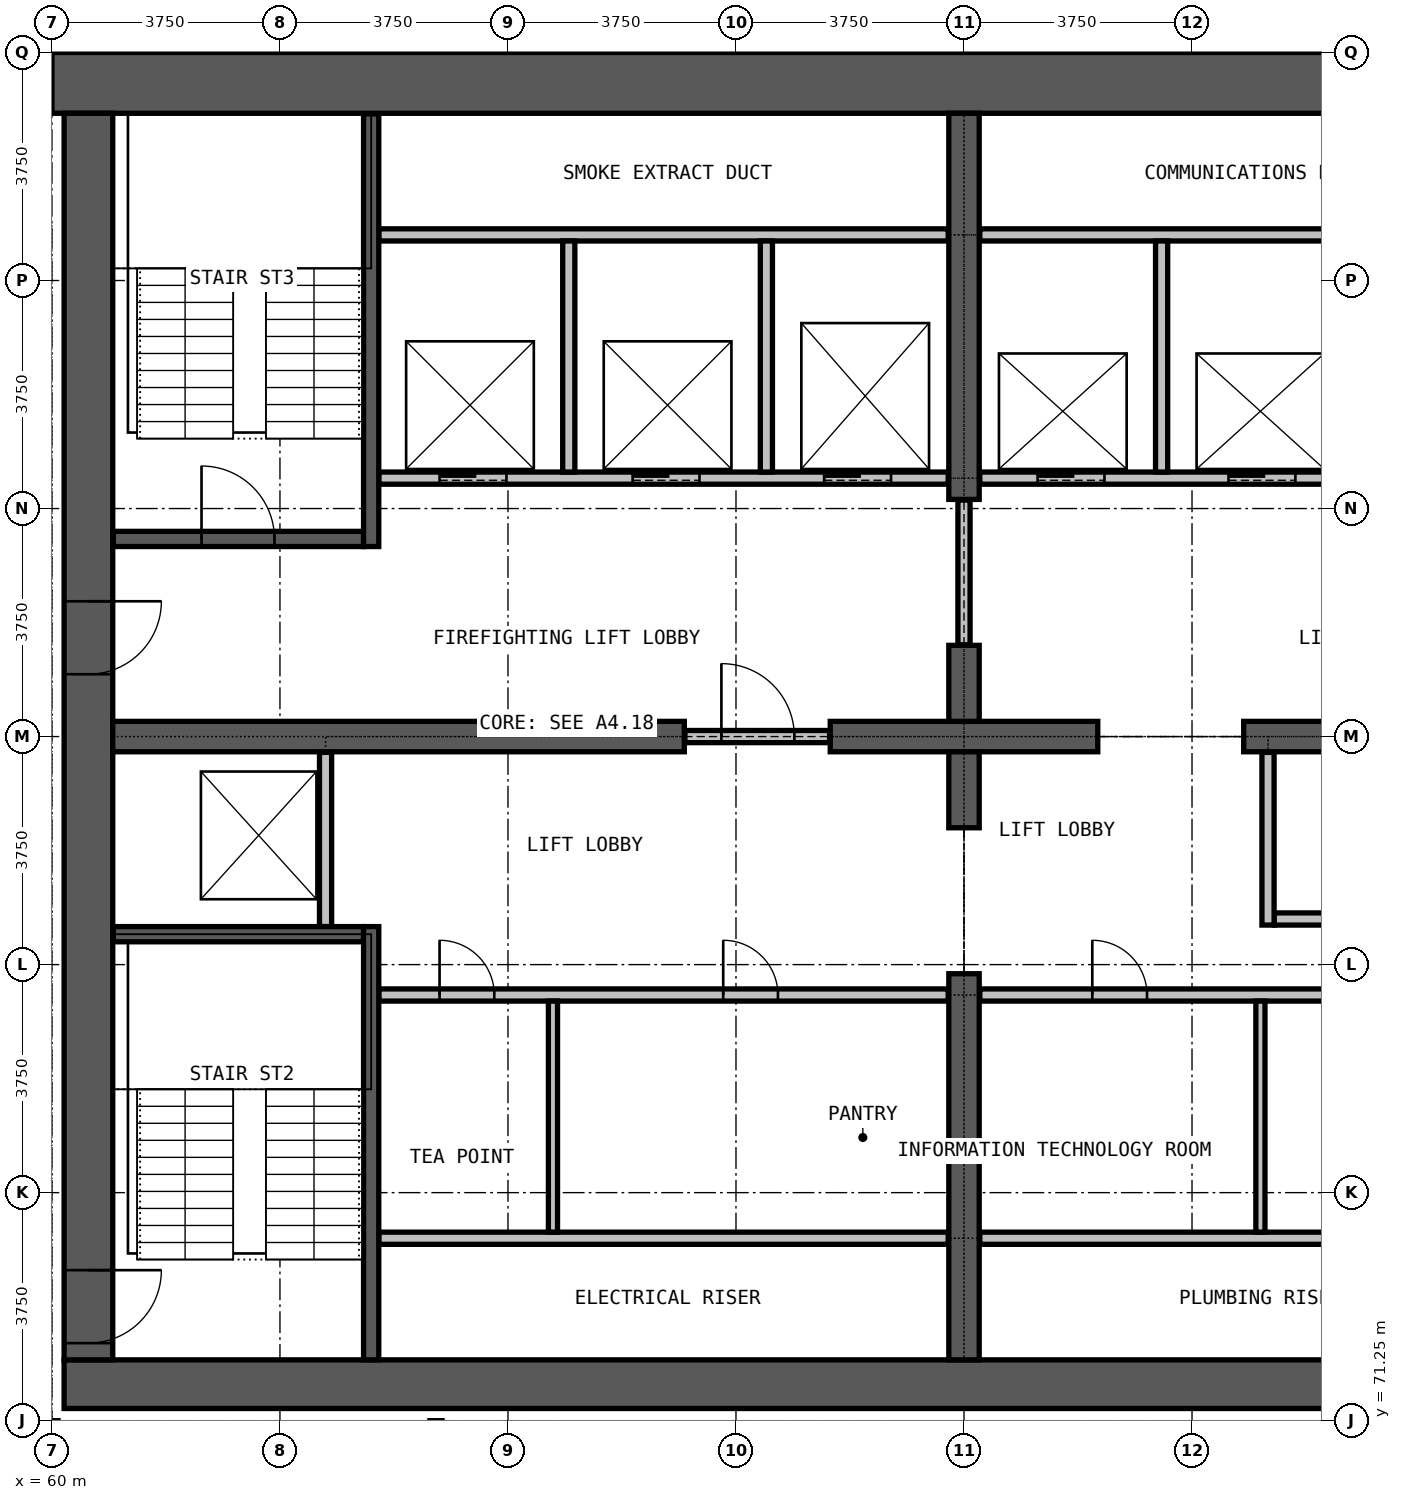
"""IFC4 building model, lengths in metres.
Left out: names, types, materials, properties, quantities, classifications, styles, units other than length and angle.
Written with IfcOpenShell. Run it as: python <this file> out.ifc"""

import sys

from ifc_helpers import new_model, si_unit, direction, frame, frame_2d, origin, place, context, subcontext, project, spatial, rectangle, extrude, element, fill, save


model = new_model("IFC4")
c1 = context("Model", 3, precision=1e-05, world=origin(), true_north=direction((0.0, 1.0)))
c2 = subcontext(c1, "Body", "Model", "MODEL_VIEW")
j1 = project(units=[si_unit("LENGTHUNIT", "METRE"), si_unit("PLANEANGLEUNIT", "RADIAN")], contexts=[c1])
p1 = place(None, origin())
s1 = spatial("IfcSite", under=j1, at=p1, CompositionType="ELEMENT")
p2 = place(p1, origin())
s2 = spatial("IfcBuilding", under=s1, at=p2, CompositionType="ELEMENT")
p3 = place(p2, frame((0.0, 0.0, 169.3)))
s3 = spatial("IfcBuildingStorey", under=s2, at=p3, CompositionType="ELEMENT", Elevation=169.3)
p4 = place(p3, frame((60.2, 71.85, 0.0), z_axis=(0.0, 0.0, 1.0), x_axis=(1.0, 0.0, 0.0)))
e1 = element("IfcWall", 1, at=p4, inside=s3, PredefinedType="SHEAR", context=c2, shape_type="SweptSolid", body=[
    extrude(rectangle(XDim=29.6, YDim=0.8, at=frame_2d((14.8, 0.0))), origin(), (0.0, 0.0, 1.0), 3.6),
])
p5 = place(p3, frame((90.0, 93.25, 0.0), z_axis=(0.0, 0.0, 1.0), x_axis=(-1.0, 0.0, 0.0)))
e2 = element("IfcWall", 2, at=p5, inside=s3, PredefinedType="SHEAR", context=c2, shape_type="SweptSolid", body=[
    extrude(rectangle(XDim=30.0, YDim=1.0, at=frame_2d((15.0, 0.0))), origin(), (0.0, 0.0, 1.0), 3.6),
])
p6 = place(p3, frame((60.6, 92.75, 0.0), z_axis=(0.0, 0.0, 1.0), x_axis=(0.0, -1.0, 0.0)))
e3 = element("IfcWall", 3, at=p6, inside=s3, PredefinedType="SHEAR", context=c2, shape_type="SweptSolid", body=[
    extrude(rectangle(XDim=20.5, YDim=0.8, at=frame_2d((10.25, 0.0))), origin(), (0.0, 0.0, 1.0), 3.6),
])
p7 = place(p6, frame((19.025, 0.0, 0.0)))
e4 = element("IfcOpeningElement", 4, at=p7, cuts=e3, PredefinedType="OPENING", context=c2, shape_type="SweptSolid", body=[
    extrude(rectangle(XDim=1.2, YDim=2.2, at=frame_2d((0.6, 1.1))), frame((0.0, 0.41, 0.0), z_axis=(0.0, -1.0, 0.0), x_axis=(1.0, 0.0, 0.0)), (0.0, 0.0, 1.0), 0.82),
])
p8 = place(p6, frame((8.025, 0.0, 0.0)))
e5 = element("IfcOpeningElement", 5, at=p8, cuts=e3, PredefinedType="OPENING", context=c2, shape_type="SweptSolid", body=[
    extrude(rectangle(XDim=1.2, YDim=2.2, at=frame_2d((0.6, 1.1))), frame((0.0, 0.41, 0.0), z_axis=(0.0, -1.0, 0.0), x_axis=(1.0, 0.0, 0.0)), (0.0, 0.0, 1.0), 0.82),
])
p9 = place(p3, frame((61.0, 82.5, 0.0), z_axis=(0.0, 0.0, 1.0), x_axis=(1.0, 0.0, 0.0)))
e6 = element("IfcWall", 6, at=p9, inside=s3, PredefinedType="SHEAR", context=c2, shape_type="SweptSolid", body=[
    extrude(rectangle(XDim=9.4, YDim=0.5, at=frame_2d((4.7, 0.0))), origin(), (0.0, 0.0, 1.0), 3.6),
])
p10 = place(p3, frame((72.8, 82.5, 0.0), z_axis=(0.0, 0.0, 1.0), x_axis=(1.0, 0.0, 0.0)))
e7 = element("IfcWall", 7, at=p10, inside=s3, PredefinedType="SHEAR", context=c2, shape_type="SweptSolid", body=[
    extrude(rectangle(XDim=4.4, YDim=0.5, at=frame_2d((2.2, 0.0))), origin(), (0.0, 0.0, 1.0), 3.6),
])
p11 = place(p3, frame((79.6, 82.5, 0.0), z_axis=(0.0, 0.0, 1.0), x_axis=(1.0, 0.0, 0.0)))
e8 = element("IfcWall", 8, at=p11, inside=s3, PredefinedType="SHEAR", context=c2, shape_type="SweptSolid", body=[
    extrude(rectangle(XDim=9.4, YDim=0.5, at=frame_2d((4.7, 0.0))), origin(), (0.0, 0.0, 1.0), 3.6),
])
p12 = place(p3, frame((75.0, 72.25, 0.0), z_axis=(0.0, 0.0, 1.0), x_axis=(0.0, 1.0, 0.0)))
e9 = element("IfcWall", 9, at=p12, inside=s3, PredefinedType="SHEAR", context=c2, shape_type="SweptSolid", body=[
    extrude(rectangle(XDim=6.35, YDim=0.5, at=frame_2d((3.175, 0.0))), origin(), (0.0, 0.0, 1.0), 3.6),
])
for number, where, z_axis, x_axis in (
    (10, (75.0, 81.0, 0.0), (0.0, 0.0, 1.0), (0.0, 1.0, 0.0)),
    (11, (75.0, 82.75, 0.0), (0.0, 0.0, 1.0), (0.0, 1.0, 0.0)),
):
    element("IfcWall", number, at=place(p3, frame(where, z_axis=z_axis, x_axis=x_axis)), inside=s3, PredefinedType="SHEAR", context=c2, shape_type="SweptSolid", body=[
        extrude(rectangle(XDim=1.25, YDim=0.5, at=frame_2d((0.625, 0.0))), origin(), (0.0, 0.0, 1.0), 3.6),
    ])
p13 = place(p3, frame((75.0, 86.4, 0.0), z_axis=(0.0, 0.0, 1.0), x_axis=(0.0, 1.0, 0.0)))
e12 = element("IfcWall", 12, at=p13, inside=s3, PredefinedType="SHEAR", context=c2, shape_type="SweptSolid", body=[
    extrude(rectangle(XDim=6.35, YDim=0.5, at=frame_2d((3.175, 0.0))), origin(), (0.0, 0.0, 1.0), 3.6),
])
for number, where, z_axis, x_axis in (
    (13, (65.375, 74.25, 0.0), (0.0, 0.0, 1.0), (1.0, 0.0, 0.0)),
    (14, (75.26, 74.25, 0.0), (0.0, 0.0, 1.0), (1.0, 0.0, 0.0)),
):
    element("IfcWall", number, at=place(p3, frame(where, z_axis=z_axis, x_axis=x_axis)), inside=s3, PredefinedType="PARTITIONING", context=c2, shape_type="SweptSolid", body=[
        extrude(rectangle(XDim=9.365, YDim=0.2, at=frame_2d((4.683, 0.0))), origin(), (0.0, 0.0, 1.0), 3.3),
    ])
p14 = place(p3, frame((65.375, 78.25, 0.0), z_axis=(0.0, 0.0, 1.0), x_axis=(1.0, 0.0, 0.0)))
e15 = element("IfcWall", 15, at=p14, inside=s3, PredefinedType="PARTITIONING", context=c2, shape_type="SweptSolid", body=[
    extrude(rectangle(XDim=9.365, YDim=0.2, at=frame_2d((4.683, 0.0))), origin(), (0.0, 0.0, 1.0), 3.3),
])
p15 = place(p14, frame((1.0, 0.0, 0.0)))
e16 = element("IfcOpeningElement", 16, at=p15, cuts=e15, PredefinedType="OPENING", context=c2, shape_type="SweptSolid", body=[
    extrude(rectangle(XDim=0.9, YDim=2.2, at=frame_2d((0.45, 1.1))), frame((0.0, 0.11, 0.0), z_axis=(0.0, -1.0, 0.0), x_axis=(1.0, 0.0, 0.0)), (0.0, 0.0, 1.0), 0.22),
])
p16 = place(p14, frame((5.665, 0.0, 0.0)))
e17 = element("IfcOpeningElement", 17, at=p16, cuts=e15, PredefinedType="OPENING", context=c2, shape_type="SweptSolid", body=[
    extrude(rectangle(XDim=0.9, YDim=2.2, at=frame_2d((0.45, 1.1))), frame((0.0, 0.11, 0.0), z_axis=(0.0, -1.0, 0.0), x_axis=(1.0, 0.0, 0.0)), (0.0, 0.0, 1.0), 0.22),
])
p17 = place(p3, frame((75.26, 78.25, 0.0), z_axis=(0.0, 0.0, 1.0), x_axis=(1.0, 0.0, 0.0)))
e18 = element("IfcWall", 18, at=p17, inside=s3, PredefinedType="PARTITIONING", context=c2, shape_type="SweptSolid", body=[
    extrude(rectangle(XDim=9.365, YDim=0.2, at=frame_2d((4.683, 0.0))), origin(), (0.0, 0.0, 1.0), 3.3),
])
p18 = place(p17, frame((1.85, 0.0, 0.0)))
e19 = element("IfcOpeningElement", 19, at=p18, cuts=e18, PredefinedType="OPENING", context=c2, shape_type="SweptSolid", body=[
    extrude(rectangle(XDim=0.9, YDim=2.2, at=frame_2d((0.45, 1.1))), frame((0.0, 0.11, 0.0), z_axis=(0.0, -1.0, 0.0), x_axis=(1.0, 0.0, 0.0)), (0.0, 0.0, 1.0), 0.22),
])
p19 = place(p17, frame((6.515, 0.0, 0.0)))
e20 = element("IfcOpeningElement", 20, at=p19, cuts=e18, PredefinedType="OPENING", context=c2, shape_type="SweptSolid", body=[
    extrude(rectangle(XDim=0.9, YDim=2.2, at=frame_2d((0.45, 1.1))), frame((0.0, 0.11, 0.0), z_axis=(0.0, -1.0, 0.0), x_axis=(1.0, 0.0, 0.0)), (0.0, 0.0, 1.0), 0.22),
])
p20 = place(p3, frame((80.1, 79.5, 0.0), z_axis=(0.0, 0.0, 1.0), x_axis=(1.0, 0.0, 0.0)))
e21 = element("IfcWall", 21, at=p20, inside=s3, PredefinedType="PARTITIONING", context=c2, shape_type="SweptSolid", body=[
    extrude(rectangle(XDim=5.3, YDim=0.2, at=frame_2d((2.65, 0.0))), origin(), (0.0, 0.0, 1.0), 3.3),
])
p21 = place(p20, frame((2.2, 0.0, 0.0)))
e22 = element("IfcOpeningElement", 22, at=p21, cuts=e21, PredefinedType="OPENING", context=c2, shape_type="SweptSolid", body=[
    extrude(rectangle(XDim=0.9, YDim=2.2, at=frame_2d((0.45, 1.1))), frame((0.0, 0.11, 0.0), z_axis=(0.0, -1.0, 0.0), x_axis=(1.0, 0.0, 0.0)), (0.0, 0.0, 1.0), 0.22),
])
p22 = place(p3, frame((70.41, 82.5, 0.0), z_axis=(0.0, 0.0, 1.0), x_axis=(1.0, 0.0, 0.0)))
e23 = element("IfcWall", 23, at=p22, inside=s3, PredefinedType="PARTITIONING", context=c2, shape_type="SweptSolid", body=[
    extrude(rectangle(XDim=2.38, YDim=0.2, at=frame_2d((1.19, 0.0))), origin(), (0.0, 0.0, 1.0), 2.4),
])
p23 = place(p22, frame((0.6, 0.0, 0.0)))
e24 = element("IfcOpeningElement", 24, at=p23, cuts=e23, PredefinedType="OPENING", context=c2, shape_type="SweptSolid", body=[
    extrude(rectangle(XDim=1.2, YDim=2.2, at=frame_2d((0.6, 1.1))), frame((0.0, 0.11, 0.0), z_axis=(0.0, -1.0, 0.0), x_axis=(1.0, 0.0, 0.0)), (0.0, 0.0, 1.0), 0.22),
])
p24 = place(p3, frame((75.0, 84.01, 0.0), z_axis=(0.0, 0.0, 1.0), x_axis=(0.0, 1.0, 0.0)))
e25 = element("IfcWall", 25, at=p24, inside=s3, PredefinedType="PARTITIONING", context=c2, shape_type="SweptSolid", body=[
    extrude(rectangle(XDim=2.38, YDim=0.2, at=frame_2d((1.19, 0.0))), origin(), (0.0, 0.0, 1.0), 2.4),
])
p25 = place(p3, frame((80.0, 79.4, 0.0), z_axis=(0.0, 0.0, 1.0), x_axis=(0.0, 1.0, 0.0)))
e26 = element("IfcWall", 26, at=p25, inside=s3, PredefinedType="PARTITIONING", context=c2, shape_type="SweptSolid", body=[
    extrude(rectangle(XDim=2.84, YDim=0.2, at=frame_2d((1.42, 0.0))), origin(), (0.0, 0.0, 1.0), 3.3),
])
for number, where, z_axis, x_axis in (
    (27, (68.24, 74.35, 0.0), (0.0, 0.0, 1.0), (0.0, 1.0, 0.0)),
    (28, (79.875, 74.35, 0.0), (0.0, 0.0, 1.0), (0.0, 1.0, 0.0)),
):
    element("IfcWall", number, at=place(p3, frame(where, z_axis=z_axis, x_axis=x_axis)), inside=s3, PredefinedType="PARTITIONING", context=c2, shape_type="SweptSolid", body=[
        extrude(rectangle(XDim=3.8, YDim=0.15, at=frame_2d((1.9, 0.0))), origin(), (0.0, 0.0, 1.0), 3.3),
    ])
p26 = place(p3, frame((65.375, 86.75, 0.0), z_axis=(0.0, 0.0, 1.0), x_axis=(1.0, 0.0, 0.0)))
e29 = element("IfcWall", 29, at=p26, inside=s3, PredefinedType="PARTITIONING", context=c2, shape_type="SweptSolid", body=[
    extrude(rectangle(XDim=9.365, YDim=0.2, at=frame_2d((4.683, 0.0))), origin(), (0.0, 0.0, 1.0), 3.3),
])
p27 = place(p26, frame((1.0, 0.0, 0.0)))
e30 = element("IfcOpeningElement", 30, at=p27, cuts=e29, PredefinedType="OPENING", context=c2, shape_type="SweptSolid", body=[
    extrude(rectangle(XDim=1.1, YDim=2.2, at=frame_2d((0.55, 1.1))), frame((0.0, 0.11, 0.0), z_axis=(0.0, -1.0, 0.0), x_axis=(1.0, 0.0, 0.0)), (0.0, 0.0, 1.0), 0.22),
])
p28 = place(p26, frame((4.175, 0.0, 0.0)))
e31 = element("IfcOpeningElement", 31, at=p28, cuts=e29, PredefinedType="OPENING", context=c2, shape_type="SweptSolid", body=[
    extrude(rectangle(XDim=1.1, YDim=2.2, at=frame_2d((0.55, 1.1))), frame((0.0, 0.11, 0.0), z_axis=(0.0, -1.0, 0.0), x_axis=(1.0, 0.0, 0.0)), (0.0, 0.0, 1.0), 0.22),
])
p29 = place(p26, frame((7.325, 0.0, 0.0)))
e32 = element("IfcOpeningElement", 32, at=p29, cuts=e29, PredefinedType="OPENING", context=c2, shape_type="SweptSolid", body=[
    extrude(rectangle(XDim=1.1, YDim=2.2, at=frame_2d((0.55, 1.1))), frame((0.0, 0.11, 0.0), z_axis=(0.0, -1.0, 0.0), x_axis=(1.0, 0.0, 0.0)), (0.0, 0.0, 1.0), 0.22),
])
p30 = place(p3, frame((75.26, 86.75, 0.0), z_axis=(0.0, 0.0, 1.0), x_axis=(1.0, 0.0, 0.0)))
e33 = element("IfcWall", 33, at=p30, inside=s3, PredefinedType="PARTITIONING", context=c2, shape_type="SweptSolid", body=[
    extrude(rectangle(XDim=9.365, YDim=0.2, at=frame_2d((4.683, 0.0))), origin(), (0.0, 0.0, 1.0), 3.3),
])
p31 = place(p30, frame((0.95, 0.0, 0.0)))
e34 = element("IfcOpeningElement", 34, at=p31, cuts=e33, PredefinedType="OPENING", context=c2, shape_type="SweptSolid", body=[
    extrude(rectangle(XDim=1.1, YDim=2.2, at=frame_2d((0.55, 1.1))), frame((0.0, 0.11, 0.0), z_axis=(0.0, -1.0, 0.0), x_axis=(1.0, 0.0, 0.0)), (0.0, 0.0, 1.0), 0.22),
])
p32 = place(p30, frame((4.09, 0.0, 0.0)))
e35 = element("IfcOpeningElement", 35, at=p32, cuts=e33, PredefinedType="OPENING", context=c2, shape_type="SweptSolid", body=[
    extrude(rectangle(XDim=1.1, YDim=2.2, at=frame_2d((0.55, 1.1))), frame((0.0, 0.11, 0.0), z_axis=(0.0, -1.0, 0.0), x_axis=(1.0, 0.0, 0.0)), (0.0, 0.0, 1.0), 0.22),
])
p33 = place(p30, frame((7.24, 0.0, 0.0)))
e36 = element("IfcOpeningElement", 36, at=p33, cuts=e33, PredefinedType="OPENING", context=c2, shape_type="SweptSolid", body=[
    extrude(rectangle(XDim=1.1, YDim=2.2, at=frame_2d((0.55, 1.1))), frame((0.0, 0.11, 0.0), z_axis=(0.0, -1.0, 0.0), x_axis=(1.0, 0.0, 0.0)), (0.0, 0.0, 1.0), 0.22),
])
for number, where, z_axis, x_axis in (
    (37, (65.375, 90.75, 0.0), (0.0, 0.0, 1.0), (1.0, 0.0, 0.0)),
    (38, (75.26, 90.75, 0.0), (0.0, 0.0, 1.0), (1.0, 0.0, 0.0)),
):
    element("IfcWall", number, at=place(p3, frame(where, z_axis=z_axis, x_axis=x_axis)), inside=s3, PredefinedType="PARTITIONING", context=c2, shape_type="SweptSolid", body=[
        extrude(rectangle(XDim=9.365, YDim=0.2, at=frame_2d((4.683, 0.0))), origin(), (0.0, 0.0, 1.0), 3.3),
    ])
p34 = place(p3, frame((64.5, 79.375, 0.0), z_axis=(0.0, 0.0, 1.0), x_axis=(0.0, 1.0, 0.0)))
e39 = element("IfcWall", 39, at=p34, inside=s3, PredefinedType="PARTITIONING", context=c2, shape_type="SweptSolid", body=[
    extrude(rectangle(XDim=2.865, YDim=0.2, at=frame_2d((1.433, 0.0))), origin(), (0.0, 0.0, 1.0), 3.3),
])
for number, where, z_axis, x_axis in (
    (40, (68.5, 86.85, 0.0), (0.0, 0.0, 1.0), (0.0, 1.0, 0.0)),
    (41, (71.75, 86.85, 0.0), (0.0, 0.0, 1.0), (0.0, 1.0, 0.0)),
    (42, (78.25, 86.85, 0.0), (0.0, 0.0, 1.0), (0.0, 1.0, 0.0)),
):
    element("IfcWall", number, at=place(p3, frame(where, z_axis=z_axis, x_axis=x_axis)), inside=s3, PredefinedType="PARTITIONING", context=c2, shape_type="SweptSolid", body=[
        extrude(rectangle(XDim=3.8, YDim=0.2, at=frame_2d((1.9, 0.0))), origin(), (0.0, 0.0, 1.0), 3.3),
    ])
p35 = place(p3, frame((61.01, 79.25, 0.0), z_axis=(0.0, 0.0, 1.0), x_axis=(1.0, 0.0, 0.0)))
e43 = element("IfcWall", 43, at=p35, inside=s3, PredefinedType="PARTITIONING", context=c2, shape_type="SweptSolid", body=[
    extrude(rectangle(XDim=4.115, YDim=0.25, at=frame_2d((2.058, 0.0))), origin(), (0.0, 0.0, 1.0), 3.3),
])
p36 = place(p3, frame((61.01, 85.75, 0.0), z_axis=(0.0, 0.0, 1.0), x_axis=(1.0, 0.0, 0.0)))
e44 = element("IfcWall", 44, at=p36, inside=s3, PredefinedType="PARTITIONING", context=c2, shape_type="SweptSolid", body=[
    extrude(rectangle(XDim=4.115, YDim=0.25, at=frame_2d((2.058, 0.0))), origin(), (0.0, 0.0, 1.0), 3.3),
])
p37 = place(p36, frame((1.45, 0.0, 0.0)))
e45 = element("IfcOpeningElement", 45, at=p37, cuts=e44, PredefinedType="OPENING", context=c2, shape_type="SweptSolid", body=[
    extrude(rectangle(XDim=1.2, YDim=2.2, at=frame_2d((0.6, 1.1))), frame((0.0, 0.135, 0.0), z_axis=(0.0, -1.0, 0.0), x_axis=(1.0, 0.0, 0.0)), (0.0, 0.0, 1.0), 0.27),
])
p38 = place(p3, frame((65.25, 72.25, 0.0), z_axis=(0.0, 0.0, 1.0), x_axis=(0.0, 1.0, 0.0)))
e46 = element("IfcWall", 46, at=p38, inside=s3, PredefinedType="PARTITIONING", context=c2, shape_type="SweptSolid", body=[
    extrude(rectangle(XDim=7.125, YDim=0.25, at=frame_2d((3.562, 0.0))), origin(), (0.0, 0.0, 1.0), 3.3),
])
p39 = place(p3, frame((65.25, 85.625, 0.0), z_axis=(0.0, 0.0, 1.0), x_axis=(0.0, 1.0, 0.0)))
e47 = element("IfcWall", 47, at=p39, inside=s3, PredefinedType="PARTITIONING", context=c2, shape_type="SweptSolid", body=[
    extrude(rectangle(XDim=7.115, YDim=0.25, at=frame_2d((3.558, 0.0))), origin(), (0.0, 0.0, 1.0), 3.3),
])
p40 = place(p31, origin())
e48 = element("IfcDoor", 48, at=p40, inside=s3, OperationType="DOUBLE_DOOR_SLIDING", PredefinedType="DOOR", context=c2, shape_type="SweptSolid", body=[
    extrude(rectangle(XDim=1.1, YDim=2.2, at=frame_2d((0.55, 1.1))), frame((0.0, 0.025, 0.0), z_axis=(0.0, -1.0, 0.0), x_axis=(1.0, 0.0, 0.0)), (0.0, 0.0, 1.0), 0.05),
])
fill(e34, e48)
p41 = place(p32, origin())
e49 = element("IfcDoor", 49, at=p41, inside=s3, OperationType="DOUBLE_DOOR_SLIDING", PredefinedType="DOOR", context=c2, shape_type="SweptSolid", body=[
    extrude(rectangle(XDim=1.1, YDim=2.2, at=frame_2d((0.55, 1.1))), frame((0.0, 0.025, 0.0), z_axis=(0.0, -1.0, 0.0), x_axis=(1.0, 0.0, 0.0)), (0.0, 0.0, 1.0), 0.05),
])
fill(e35, e49)
p42 = place(p27, origin())
e50 = element("IfcDoor", 50, at=p42, inside=s3, OperationType="DOUBLE_DOOR_SLIDING", PredefinedType="DOOR", context=c2, shape_type="SweptSolid", body=[
    extrude(rectangle(XDim=1.1, YDim=2.2, at=frame_2d((0.55, 1.1))), frame((0.0, 0.025, 0.0), z_axis=(0.0, -1.0, 0.0), x_axis=(1.0, 0.0, 0.0)), (0.0, 0.0, 1.0), 0.05),
])
fill(e30, e50)
p43 = place(p28, origin())
e51 = element("IfcDoor", 51, at=p43, inside=s3, OperationType="DOUBLE_DOOR_SLIDING", PredefinedType="DOOR", context=c2, shape_type="SweptSolid", body=[
    extrude(rectangle(XDim=1.1, YDim=2.2, at=frame_2d((0.55, 1.1))), frame((0.0, 0.025, 0.0), z_axis=(0.0, -1.0, 0.0), x_axis=(1.0, 0.0, 0.0)), (0.0, 0.0, 1.0), 0.05),
])
fill(e31, e51)
p44 = place(p29, origin())
e52 = element("IfcDoor", 52, at=p44, inside=s3, OperationType="DOUBLE_DOOR_SLIDING", PredefinedType="DOOR", context=c2, shape_type="SweptSolid", body=[
    extrude(rectangle(XDim=1.1, YDim=2.2, at=frame_2d((0.55, 1.1))), frame((0.0, 0.025, 0.0), z_axis=(0.0, -1.0, 0.0), x_axis=(1.0, 0.0, 0.0)), (0.0, 0.0, 1.0), 0.05),
])
fill(e32, e52)
p45 = place(p23, origin())
e53 = element("IfcDoor", 53, at=p45, inside=s3, OperationType="SINGLE_SWING_LEFT", PredefinedType="DOOR", context=c2, shape_type="SweptSolid", body=[
    extrude(rectangle(XDim=1.2, YDim=2.2, at=frame_2d((0.6, 1.1))), frame((0.0, 0.025, 0.0), z_axis=(0.0, -1.0, 0.0), x_axis=(1.0, 0.0, 0.0)), (0.0, 0.0, 1.0), 0.05),
])
fill(e24, e53)
p46 = place(p37, origin())
e54 = element("IfcDoor", 54, at=p46, inside=s3, OperationType="SINGLE_SWING_LEFT", PredefinedType="DOOR", context=c2, shape_type="SweptSolid", body=[
    extrude(rectangle(XDim=1.2, YDim=2.2, at=frame_2d((0.6, 1.1))), frame((0.0, 0.025, 0.0), z_axis=(0.0, -1.0, 0.0), x_axis=(1.0, 0.0, 0.0)), (0.0, 0.0, 1.0), 0.05),
])
fill(e45, e54)
p47 = place(p7, origin())
e55 = element("IfcDoor", 55, at=p47, inside=s3, OperationType="SINGLE_SWING_RIGHT", PredefinedType="DOOR", context=c2, shape_type="SweptSolid", body=[
    extrude(rectangle(XDim=1.2, YDim=2.2, at=frame_2d((0.6, 1.1))), frame((0.0, 0.025, 0.0), z_axis=(0.0, -1.0, 0.0), x_axis=(1.0, 0.0, 0.0)), (0.0, 0.0, 1.0), 0.05),
])
fill(e4, e55)
p48 = place(p8, origin())
e56 = element("IfcDoor", 56, at=p48, inside=s3, OperationType="SINGLE_SWING_LEFT", PredefinedType="DOOR", context=c2, shape_type="SweptSolid", body=[
    extrude(rectangle(XDim=1.2, YDim=2.2, at=frame_2d((0.6, 1.1))), frame((0.0, 0.025, 0.0), z_axis=(0.0, -1.0, 0.0), x_axis=(1.0, 0.0, 0.0)), (0.0, 0.0, 1.0), 0.05),
])
fill(e5, e56)
p49 = place(p15, origin())
e57 = element("IfcDoor", 57, at=p49, inside=s3, OperationType="SINGLE_SWING_RIGHT", PredefinedType="DOOR", context=c2, shape_type="SweptSolid", body=[
    extrude(rectangle(XDim=0.9, YDim=2.2, at=frame_2d((0.45, 1.1))), frame((0.0, 0.025, 0.0), z_axis=(0.0, -1.0, 0.0), x_axis=(1.0, 0.0, 0.0)), (0.0, 0.0, 1.0), 0.05),
])
fill(e16, e57)
p50 = place(p16, origin())
e58 = element("IfcDoor", 58, at=p50, inside=s3, OperationType="SINGLE_SWING_LEFT", PredefinedType="DOOR", context=c2, shape_type="SweptSolid", body=[
    extrude(rectangle(XDim=0.9, YDim=2.2, at=frame_2d((0.45, 1.1))), frame((0.0, 0.025, 0.0), z_axis=(0.0, -1.0, 0.0), x_axis=(1.0, 0.0, 0.0)), (0.0, 0.0, 1.0), 0.05),
])
fill(e17, e58)
p51 = place(p18, origin())
e59 = element("IfcDoor", 59, at=p51, inside=s3, OperationType="SINGLE_SWING_RIGHT", PredefinedType="DOOR", context=c2, shape_type="SweptSolid", body=[
    extrude(rectangle(XDim=0.9, YDim=2.2, at=frame_2d((0.45, 1.1))), frame((0.0, 0.025, 0.0), z_axis=(0.0, -1.0, 0.0), x_axis=(1.0, 0.0, 0.0)), (0.0, 0.0, 1.0), 0.05),
])
fill(e19, e59)
save(model, sys.argv[1])
